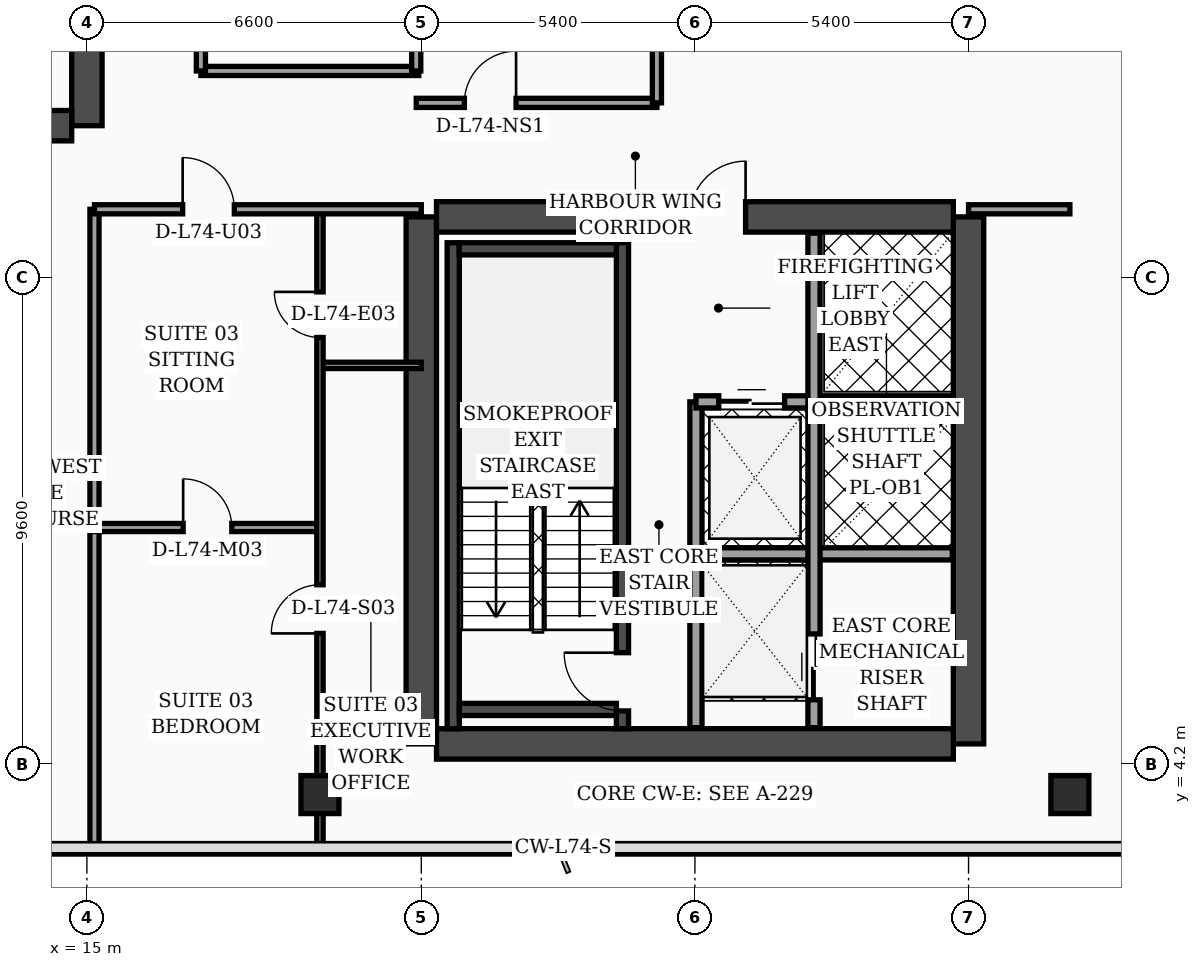
"""IFC4 building model, lengths in metres.
Left out: names, types, materials, properties, quantities, classifications, styles, units other than length and angle.
Written with IfcOpenShell. Run it as: python <this file> out.ifc"""

import sys

from ifc_helpers import new_model, si_unit, direction, frame, frame_2d, origin, origin_2d, place, context, subcontext, project, spatial, rectangle, hollow_rectangle, extrude, element, fill, save


model = new_model("IFC4")
c1 = context("Model", 3, precision=1e-05, world=origin(), true_north=direction((0.0, 1.0)))
c2 = subcontext(c1, "Body", "Model", "MODEL_VIEW")
j1 = project(units=[si_unit("LENGTHUNIT", "METRE"), si_unit("PLANEANGLEUNIT", "RADIAN")], contexts=[c1])
p1 = place(None, origin())
s1 = spatial("IfcSite", under=j1, at=p1, CompositionType="ELEMENT")
p2 = place(p1, origin())
s2 = spatial("IfcBuilding", under=s1, at=p2, CompositionType="ELEMENT")
p3 = place(p2, frame((0.0, 0.0, 298.7)))
s3 = spatial("IfcBuildingStorey", under=s2, at=p3, CompositionType="ELEMENT", Elevation=298.7)
p4 = place(p3, frame((15.0, 16.8, 0.0), z_axis=(0.0, 0.0, 1.0), x_axis=(0.0, 1.0, 0.0)))
e1 = element("IfcWall", 1, at=p4, inside=s3, PredefinedType="SHEAR", context=c2, shape_type="SweptSolid", body=[
    extrude(rectangle(XDim=21.6, YDim=0.6, at=frame_2d((10.8, 0.0))), origin(), (0.0, 0.0, 1.0), 3.56),
])
p5 = place(p4, frame((8.65, 0.0, 0.0)))
e2 = element("IfcOpeningElement", 2, at=p5, cuts=e1, PredefinedType="OPENING", context=c2, shape_type="SweptSolid", body=[
    extrude(rectangle(XDim=1.1, YDim=2.2, at=frame_2d((0.55, 1.1))), frame((0.0, 0.31, 0.0), z_axis=(0.0, -1.0, 0.0), x_axis=(1.0, 0.0, 0.0)), (0.0, 0.0, 1.0), 0.62),
])
p6 = place(p4, frame((18.9, 0.0, 0.0)))
e3 = element("IfcOpeningElement", 3, at=p6, cuts=e1, PredefinedType="OPENING", context=c2, shape_type="SweptSolid", body=[
    extrude(rectangle(XDim=1.1, YDim=2.2, at=frame_2d((0.55, 1.1))), frame((0.0, 0.31, 0.0), z_axis=(0.0, -1.0, 0.0), x_axis=(1.0, 0.0, 0.0)), (0.0, 0.0, 1.0), 0.62),
])
p7 = place(p3, frame((4.5, 16.8, 0.0), z_axis=(0.0, 0.0, 1.0), x_axis=(1.0, 0.0, 0.0)))
e4 = element("IfcWall", 4, at=p7, inside=s3, PredefinedType="SHEAR", context=c2, shape_type="SweptSolid", body=[
    extrude(rectangle(XDim=10.2, YDim=0.6, at=frame_2d((5.1, 0.0))), origin(), (0.0, 0.0, 1.0), 3.56),
])
for number, where, z_axis, x_axis in (
    (5, (21.6, 4.6, 0.0), (0.0, 0.0, 1.0), (0.0, 1.0, 0.0)),
    (6, (32.4, 4.6, 0.0), (0.0, 0.0, 1.0), (0.0, 1.0, 0.0)),
):
    element("IfcWall", number, at=place(p3, frame(where, z_axis=z_axis, x_axis=x_axis)), inside=s3, PredefinedType="SHEAR", context=c2, shape_type="SweptSolid", body=[
        extrude(rectangle(XDim=10.4, YDim=0.6, at=frame_2d((5.2, 0.0))), origin(), (0.0, 0.0, 1.0), 3.56),
    ])
p8 = place(p3, frame((21.9, 15.0, 0.0), z_axis=(0.0, 0.0, 1.0), x_axis=(1.0, 0.0, 0.0)))
e7 = element("IfcWall", 7, at=p8, inside=s3, PredefinedType="SHEAR", context=c2, shape_type="SweptSolid", body=[
    extrude(rectangle(XDim=10.2, YDim=0.6, at=frame_2d((5.1, 0.0))), origin(), (0.0, 0.0, 1.0), 3.56),
])
p9 = place(p8, frame((5.0, 0.0, 0.0)))
e8 = element("IfcOpeningElement", 8, at=p9, cuts=e7, PredefinedType="OPENING", context=c2, shape_type="SweptSolid", body=[
    extrude(rectangle(XDim=1.1, YDim=2.2, at=frame_2d((0.55, 1.1))), frame((0.0, 0.31, 0.0), z_axis=(0.0, -1.0, 0.0), x_axis=(1.0, 0.0, 0.0)), (0.0, 0.0, 1.0), 0.62),
])
p10 = place(p3, frame((21.9, 4.6, 0.0), z_axis=(0.0, 0.0, 1.0), x_axis=(1.0, 0.0, 0.0)))
e9 = element("IfcWall", 9, at=p10, inside=s3, PredefinedType="SHEAR", context=c2, shape_type="SweptSolid", body=[
    extrude(rectangle(XDim=10.2, YDim=0.6, at=frame_2d((5.1, 0.0))), origin(), (0.0, 0.0, 1.0), 3.56),
])
p11 = place(p3, frame((22.23, 4.9, 0.0), z_axis=(0.0, 0.0, 1.0), x_axis=(0.0, 1.0, 0.0)))
e10 = element("IfcWall", 10, at=p11, inside=s3, PredefinedType="SOLIDWALL", context=c2, shape_type="SweptSolid", body=[
    extrude(rectangle(XDim=9.59, YDim=0.24, at=frame_2d((4.795, 0.0))), origin(), (0.0, 0.0, 1.0), 3.56),
])
p12 = place(p3, frame((25.57, 4.9, 0.0), z_axis=(0.0, 0.0, 1.0), x_axis=(0.0, 1.0, 0.0)))
e11 = element("IfcWall", 11, at=p12, inside=s3, PredefinedType="SOLIDWALL", context=c2, shape_type="SweptSolid", body=[
    extrude(rectangle(XDim=9.59, YDim=0.24, at=frame_2d((4.795, 0.0))), origin(), (0.0, 0.0, 1.0), 3.56),
])
p13 = place(p12, frame((0.35, 0.0, 0.0)))
e12 = element("IfcOpeningElement", 12, at=p13, cuts=e11, PredefinedType="OPENING", context=c2, shape_type="SweptSolid", body=[
    extrude(rectangle(XDim=1.15, YDim=2.2, at=frame_2d((0.575, 1.1))), frame((0.0, 0.13, 0.0), z_axis=(0.0, -1.0, 0.0), x_axis=(1.0, 0.0, 0.0)), (0.0, 0.0, 1.0), 0.26),
])
for number, where, z_axis, x_axis in (
    (13, (22.35, 5.28, 0.0), (0.0, 0.0, 1.0), (1.0, 0.0, 0.0)),
    (14, (22.35, 14.37, 0.0), (0.0, 0.0, 1.0), (1.0, 0.0, 0.0)),
):
    element("IfcWall", number, at=place(p3, frame(where, z_axis=z_axis, x_axis=x_axis)), inside=s3, PredefinedType="SOLIDWALL", context=c2, shape_type="SweptSolid", body=[
        extrude(rectangle(XDim=3.1, YDim=0.24, at=frame_2d((1.55, 0.0))), origin(), (0.0, 0.0, 1.0), 3.56),
    ])
for number, where, z_axis, x_axis in (
    (15, (19.6, 3.6, 0.0), (0.0, 0.0, 1.0), (1.0, 0.0, 0.0)),
    (16, (34.4, 3.6, 0.0), (0.0, 0.0, 1.0), (1.0, 0.0, 0.0)),
):
    element("IfcColumn", number, at=place(p3, frame(where, z_axis=z_axis, x_axis=x_axis)), inside=s3, PredefinedType="COLUMN", context=c2, shape_type="SweptSolid", body=[
        extrude(hollow_rectangle(XDim=0.75, YDim=0.75, WallThickness=0.032, at=origin_2d()), origin(), (0.0, 0.0, 1.0), 3.56),
    ])
p14 = place(p3, frame((41.03, 5.505, 0.0), z_axis=(0.0, 0.0, 1.0), x_axis=(-0.300509063924, 0.953778958931, 0.0)))
e17 = element("IfcWall", 17, at=p14, inside=s3, PredefinedType="SOLIDWALL", context=c2, shape_type="SweptSolid", body=[
    extrude(rectangle(XDim=30.814, YDim=0.32, at=frame_2d((15.407, 0.0))), origin(), (0.0, 0.0, 1.0), 3.56),
])
p15 = place(p14, frame((10.199, 0.0, 0.0)))
e18 = element("IfcOpeningElement", 18, at=p15, cuts=e17, PredefinedType="OPENING", context=c2, shape_type="SweptSolid", body=[
    extrude(rectangle(XDim=1.4, YDim=2.25, at=frame_2d((0.7, 1.125))), frame((0.0, 0.17, 0.0), z_axis=(0.0, -1.0, 0.0), x_axis=(1.0, 0.0, 0.0)), (0.0, 0.0, 1.0), 0.34),
])
p16 = place(p14, frame((4.437, 0.0, 0.7)))
e19 = element("IfcOpeningElement", 19, at=p16, cuts=e17, PredefinedType="OPENING", context=c2, shape_type="SweptSolid", body=[
    extrude(rectangle(XDim=1.6, YDim=1.65, at=frame_2d((0.8, 0.825))), frame((0.0, 0.17, 0.0), z_axis=(0.0, -1.0, 0.0), x_axis=(1.0, 0.0, 0.0)), (0.0, 0.0, 1.0), 0.34),
])
p17 = place(p14, frame((18.696, 0.0, 0.7)))
e20 = element("IfcOpeningElement", 20, at=p17, cuts=e17, PredefinedType="OPENING", context=c2, shape_type="SweptSolid", body=[
    extrude(rectangle(XDim=1.6, YDim=1.65, at=frame_2d((0.8, 0.825))), frame((0.0, 0.17, 0.0), z_axis=(0.0, -1.0, 0.0), x_axis=(1.0, 0.0, 0.0)), (0.0, 0.0, 1.0), 0.34),
])
p18 = place(p14, frame((1.6, 0.0, 0.75)))
e21 = element("IfcOpeningElement", 21, at=p18, cuts=e17, PredefinedType="OPENING", context=c2, shape_type="SweptSolid", body=[
    extrude(rectangle(XDim=1.5, YDim=1.6, at=frame_2d((0.75, 0.8))), frame((0.0, 0.17, 0.0), z_axis=(0.0, -1.0, 0.0), x_axis=(1.0, 0.0, 0.0)), (0.0, 0.0, 1.0), 0.34),
])
p19 = place(p14, frame((7.8, 0.0, 0.75)))
e22 = element("IfcOpeningElement", 22, at=p19, cuts=e17, PredefinedType="OPENING", context=c2, shape_type="SweptSolid", body=[
    extrude(rectangle(XDim=1.5, YDim=1.6, at=frame_2d((0.75, 0.8))), frame((0.0, 0.17, 0.0), z_axis=(0.0, -1.0, 0.0), x_axis=(1.0, 0.0, 0.0)), (0.0, 0.0, 1.0), 0.34),
])
p20 = place(p14, frame((14.0, 0.0, 0.75)))
e23 = element("IfcOpeningElement", 23, at=p20, cuts=e17, PredefinedType="OPENING", context=c2, shape_type="SweptSolid", body=[
    extrude(rectangle(XDim=1.5, YDim=1.6, at=frame_2d((0.75, 0.8))), frame((0.0, 0.17, 0.0), z_axis=(0.0, -1.0, 0.0), x_axis=(1.0, 0.0, 0.0)), (0.0, 0.0, 1.0), 0.34),
])
p21 = place(p14, frame((16.55, 0.0, 0.75)))
e24 = element("IfcOpeningElement", 24, at=p21, cuts=e17, PredefinedType="OPENING", context=c2, shape_type="SweptSolid", body=[
    extrude(rectangle(XDim=1.5, YDim=1.6, at=frame_2d((0.75, 0.8))), frame((0.0, 0.17, 0.0), z_axis=(0.0, -1.0, 0.0), x_axis=(1.0, 0.0, 0.0)), (0.0, 0.0, 1.0), 0.34),
])
p22 = place(p14, frame((20.75, 0.0, 0.75)))
e25 = element("IfcOpeningElement", 25, at=p22, cuts=e17, PredefinedType="OPENING", context=c2, shape_type="SweptSolid", body=[
    extrude(rectangle(XDim=1.5, YDim=1.6, at=frame_2d((0.75, 0.8))), frame((0.0, 0.17, 0.0), z_axis=(0.0, -1.0, 0.0), x_axis=(1.0, 0.0, 0.0)), (0.0, 0.0, 1.0), 0.34),
])
p23 = place(p14, frame((23.3, 0.0, 0.75)))
e26 = element("IfcOpeningElement", 26, at=p23, cuts=e17, PredefinedType="OPENING", context=c2, shape_type="SweptSolid", body=[
    extrude(rectangle(XDim=1.5, YDim=1.6, at=frame_2d((0.75, 0.8))), frame((0.0, 0.17, 0.0), z_axis=(0.0, -1.0, 0.0), x_axis=(1.0, 0.0, 0.0)), (0.0, 0.0, 1.0), 0.34),
])
p24 = place(p14, frame((26.4, 0.0, 0.75)))
e27 = element("IfcOpeningElement", 27, at=p24, cuts=e17, PredefinedType="OPENING", context=c2, shape_type="SweptSolid", body=[
    extrude(rectangle(XDim=1.5, YDim=1.6, at=frame_2d((0.75, 0.8))), frame((0.0, 0.17, 0.0), z_axis=(0.0, -1.0, 0.0), x_axis=(1.0, 0.0, 0.0)), (0.0, 0.0, 1.0), 0.34),
])
p25 = place(p3, frame((27.02, 4.92, 0.0), z_axis=(0.0, 0.0, 1.0), x_axis=(0.0, 1.0, 0.0)))
e28 = element("IfcWall", 28, at=p25, inside=s3, PredefinedType="SOLIDWALL", context=c2, shape_type="SweptSolid", body=[
    extrude(rectangle(XDim=6.43, YDim=0.24, at=frame_2d((3.215, 0.0))), origin(), (0.0, 0.0, 1.0), 3.56),
])
p26 = place(p3, frame((27.02, 11.35, 0.0), z_axis=(0.0, 0.0, 1.0), x_axis=(1.0, 0.0, 0.0)))
e29 = element("IfcWall", 29, at=p26, inside=s3, PredefinedType="SOLIDWALL", context=c2, shape_type="SweptSolid", body=[
    extrude(rectangle(XDim=5.06, YDim=0.24, at=frame_2d((2.53, 0.0))), origin(), (0.0, 0.0, 1.0), 3.56),
])
p27 = place(p26, frame((0.45, 0.0, 0.0)))
e30 = element("IfcOpeningElement", 30, at=p27, cuts=e29, PredefinedType="OPENING", context=c2, shape_type="SweptSolid", body=[
    extrude(rectangle(XDim=1.3, YDim=2.35, at=frame_2d((0.65, 1.175))), frame((0.0, 0.13, 0.0), z_axis=(0.0, -1.0, 0.0), x_axis=(1.0, 0.0, 0.0)), (0.0, 0.0, 1.0), 0.26),
])
p28 = place(p3, frame((27.02, 8.35, 0.0), z_axis=(0.0, 0.0, 1.0), x_axis=(1.0, 0.0, 0.0)))
e31 = element("IfcWall", 31, at=p28, inside=s3, PredefinedType="SOLIDWALL", context=c2, shape_type="SweptSolid", body=[
    extrude(rectangle(XDim=5.06, YDim=0.24, at=frame_2d((2.53, 0.0))), origin(), (0.0, 0.0, 1.0), 3.56),
])
p29 = place(p3, frame((29.35, 4.92, 0.0), z_axis=(0.0, 0.0, 1.0), x_axis=(0.0, 1.0, 0.0)))
e32 = element("IfcWall", 32, at=p29, inside=s3, PredefinedType="SOLIDWALL", context=c2, shape_type="SweptSolid", body=[
    extrude(rectangle(XDim=9.76, YDim=0.24, at=frame_2d((4.88, 0.0))), origin(), (0.0, 0.0, 1.0), 3.56),
])
p30 = place(p29, frame((0.55, 0.0, 0.0)))
e33 = element("IfcOpeningElement", 33, at=p30, cuts=e32, PredefinedType="OPENING", context=c2, shape_type="SweptSolid", body=[
    extrude(rectangle(XDim=1.3, YDim=2.35, at=frame_2d((0.65, 1.175))), frame((0.0, 0.13, 0.0), z_axis=(0.0, -1.0, 0.0), x_axis=(1.0, 0.0, 0.0)), (0.0, 0.0, 1.0), 0.26),
])
p31 = place(p3, frame((15.15, 2.44, 0.0), z_axis=(0.0, 0.0, 1.0), x_axis=(0.0, 1.0, 0.0)))
e34 = element("IfcWall", 34, at=p31, inside=s3, PredefinedType="PARTITIONING", context=c2, shape_type="SweptSolid", body=[
    extrude(rectangle(XDim=12.71, YDim=0.18, at=frame_2d((6.355, 0.0))), origin(), (0.0, 0.0, 1.0), 3.09),
])
p32 = place(p3, frame((19.6, 12.07, 0.0), z_axis=(0.0, 0.0, 1.0), x_axis=(1.0, 0.0, 0.0)))
e35 = element("IfcWall", 35, at=p32, inside=s3, PredefinedType="PARTITIONING", context=c2, shape_type="SweptSolid", body=[
    extrude(rectangle(XDim=2.0, YDim=0.125, at=frame_2d((1.0, 0.0))), origin(), (0.0, 0.0, 1.0), 3.56),
])
p33 = place(p3, frame((15.15, 8.87, 0.0), z_axis=(0.0, 0.0, 1.0), x_axis=(1.0, 0.0, 0.0)))
e36 = element("IfcWall", 36, at=p33, inside=s3, PredefinedType="PARTITIONING", context=c2, shape_type="SweptSolid", body=[
    extrude(rectangle(XDim=4.45, YDim=0.16, at=frame_2d((2.225, 0.0))), origin(), (0.0, 0.0, 1.0), 3.56),
])
p34 = place(p33, frame((1.75, 0.0, 0.0)))
e37 = element("IfcOpeningElement", 37, at=p34, cuts=e36, PredefinedType="OPENING", context=c2, shape_type="SweptSolid", body=[
    extrude(rectangle(XDim=0.96, YDim=2.2, at=frame_2d((0.48, 1.1))), frame((0.0, 0.09, 0.0), z_axis=(0.0, -1.0, 0.0), x_axis=(1.0, 0.0, 0.0)), (0.0, 0.0, 1.0), 0.18),
])
p35 = place(p3, frame((19.6, 2.44, 0.0), z_axis=(0.0, 0.0, 1.0), x_axis=(0.0, 1.0, 0.0)))
e38 = element("IfcWall", 38, at=p35, inside=s3, PredefinedType="PARTITIONING", context=c2, shape_type="SweptSolid", body=[
    extrude(rectangle(XDim=12.71, YDim=0.125, at=frame_2d((6.355, 0.0))), origin(), (0.0, 0.0, 1.0), 2.59),
])
p36 = place(p35, frame((4.34, 0.0, 0.0)))
e39 = element("IfcOpeningElement", 39, at=p36, cuts=e38, PredefinedType="OPENING", context=c2, shape_type="SweptSolid", body=[
    extrude(rectangle(XDim=0.96, YDim=2.2, at=frame_2d((0.48, 1.1))), frame((0.0, 0.073, 0.0), z_axis=(0.0, -1.0, 0.0), x_axis=(1.0, 0.0, 0.0)), (0.0, 0.0, 1.0), 0.145),
])
p37 = place(p35, frame((10.18, 0.0, 0.0)))
e40 = element("IfcOpeningElement", 40, at=p37, cuts=e38, PredefinedType="OPENING", context=c2, shape_type="SweptSolid", body=[
    extrude(rectangle(XDim=0.9, YDim=2.15, at=frame_2d((0.45, 1.075))), frame((0.0, 0.073, 0.0), z_axis=(0.0, -1.0, 0.0), x_axis=(1.0, 0.0, 0.0)), (0.0, 0.0, 1.0), 0.145),
])
p38 = place(p3, frame((15.15, 15.15, 0.0), z_axis=(0.0, 0.0, 1.0), x_axis=(1.0, 0.0, 0.0)))
e41 = element("IfcWall", 41, at=p38, inside=s3, PredefinedType="PARTITIONING", context=c2, shape_type="SweptSolid", body=[
    extrude(rectangle(XDim=6.45, YDim=0.18, at=frame_2d((3.225, 0.0))), origin(), (0.0, 0.0, 1.0), 2.59),
])
p39 = place(p38, frame((1.74, 0.0, 0.0)))
e42 = element("IfcOpeningElement", 42, at=p39, cuts=e41, PredefinedType="OPENING", context=c2, shape_type="SweptSolid", body=[
    extrude(rectangle(XDim=1.02, YDim=2.2, at=frame_2d((0.51, 1.1))), frame((0.0, 0.1, 0.0), z_axis=(0.0, -1.0, 0.0), x_axis=(1.0, 0.0, 0.0)), (0.0, 0.0, 1.0), 0.2),
])
p40 = place(p3, frame((17.25, 17.88, 0.0), z_axis=(0.0, 0.0, 1.0), x_axis=(1.0, 0.0, 0.0)))
e43 = element("IfcWall", 43, at=p40, inside=s3, PredefinedType="PARTITIONING", context=c2, shape_type="SweptSolid", body=[
    extrude(rectangle(XDim=4.3, YDim=0.18, at=frame_2d((2.15, 0.0))), origin(), (0.0, 0.0, 1.0), 3.56),
])
p41 = place(p3, frame((21.5, 17.88, 0.0), z_axis=(0.0, 0.0, 1.0), x_axis=(0.0, 1.0, 0.0)))
e44 = element("IfcWall", 44, at=p41, inside=s3, PredefinedType="PARTITIONING", context=c2, shape_type="SweptSolid", body=[
    extrude(rectangle(XDim=6.44, YDim=0.18, at=frame_2d((3.22, 0.0))), origin(), (0.0, 0.0, 1.0), 3.09),
])
p42 = place(p3, frame((17.25, 17.88, 0.0), z_axis=(0.0, 0.0, 1.0), x_axis=(0.0, 1.0, 0.0)))
e45 = element("IfcWall", 45, at=p42, inside=s3, PredefinedType="PARTITIONING", context=c2, shape_type="SweptSolid", body=[
    extrude(rectangle(XDim=6.44, YDim=0.18, at=frame_2d((3.22, 0.0))), origin(), (0.0, 0.0, 1.0), 3.09),
])
p43 = place(p42, frame((0.65, 0.0, 0.0)))
e46 = element("IfcOpeningElement", 46, at=p43, cuts=e45, PredefinedType="OPENING", context=c2, shape_type="SweptSolid", body=[
    extrude(rectangle(XDim=0.98, YDim=2.15, at=frame_2d((0.49, 1.075))), frame((0.0, 0.1, 0.0), z_axis=(0.0, -1.0, 0.0), x_axis=(1.0, 0.0, 0.0)), (0.0, 0.0, 1.0), 0.2),
])
p44 = place(p42, frame((3.27, 0.0, 0.0)))
e47 = element("IfcOpeningElement", 47, at=p44, cuts=e45, PredefinedType="OPENING", context=c2, shape_type="SweptSolid", body=[
    extrude(rectangle(XDim=0.96, YDim=2.2, at=frame_2d((0.48, 1.1))), frame((0.0, 0.1, 0.0), z_axis=(0.0, -1.0, 0.0), x_axis=(1.0, 0.0, 0.0)), (0.0, 0.0, 1.0), 0.2),
])
p45 = place(p3, frame((32.4, 15.15, 0.0), z_axis=(0.0, 0.0, 1.0), x_axis=(1.0, 0.0, 0.0)))
e48 = element("IfcWall", 48, at=p45, inside=s3, PredefinedType="PARTITIONING", context=c2, shape_type="SweptSolid", body=[
    extrude(rectangle(XDim=2.0, YDim=0.18, at=frame_2d((1.0, 0.0))), origin(), (0.0, 0.0, 1.0), 2.99),
])
p46 = place(p3, frame((21.5, 17.25, 0.0), z_axis=(0.0, 0.0, 1.0), x_axis=(1.0, 0.0, 0.0)))
e49 = element("IfcWall", 49, at=p46, inside=s3, PredefinedType="PARTITIONING", context=c2, shape_type="SweptSolid", body=[
    extrude(rectangle(XDim=4.75, YDim=0.18, at=frame_2d((2.375, 0.0))), origin(), (0.0, 0.0, 1.0), 3.56),
])
p47 = place(p46, frame((0.95, 0.0, 0.0)))
e50 = element("IfcOpeningElement", 50, at=p47, cuts=e49, PredefinedType="OPENING", context=c2, shape_type="SweptSolid", body=[
    extrude(rectangle(XDim=1.02, YDim=2.2, at=frame_2d((0.51, 1.1))), frame((0.0, 0.1, 0.0), z_axis=(0.0, -1.0, 0.0), x_axis=(1.0, 0.0, 0.0)), (0.0, 0.0, 1.0), 0.2),
])
p48 = place(p3, frame((26.25, 17.25, 0.0), z_axis=(0.0, 0.0, 1.0), x_axis=(0.0, 1.0, 0.0)))
e51 = element("IfcWall", 51, at=p48, inside=s3, PredefinedType="PARTITIONING", context=c2, shape_type="SweptSolid", body=[
    extrude(rectangle(XDim=17.43, YDim=0.18, at=frame_2d((8.715, 0.0))), origin(), (0.0, 0.0, 1.0), 3.09),
])
p49 = place(p27, origin())
e52 = element("IfcDoor", 52, at=p49, inside=s3, OperationType="DOUBLE_DOOR_SLIDING", PredefinedType="DOOR", context=c2, shape_type="SweptSolid", body=[
    extrude(rectangle(XDim=1.3, YDim=2.35, at=frame_2d((0.65, 1.175))), frame((0.0, 0.025, 0.0), z_axis=(0.0, -1.0, 0.0), x_axis=(1.0, 0.0, 0.0)), (0.0, 0.0, 1.0), 0.05),
])
fill(e30, e52)
p50 = place(p30, origin())
e53 = element("IfcDoor", 53, at=p50, inside=s3, OperationType="DOUBLE_DOOR_SLIDING", PredefinedType="DOOR", context=c2, shape_type="SweptSolid", body=[
    extrude(rectangle(XDim=1.3, YDim=2.35, at=frame_2d((0.65, 1.175))), frame((0.0, 0.025, 0.0), z_axis=(0.0, -1.0, 0.0), x_axis=(1.0, 0.0, 0.0)), (0.0, 0.0, 1.0), 0.05),
])
fill(e33, e53)
p51 = place(p34, origin())
e54 = element("IfcDoor", 54, at=p51, inside=s3, OperationType="SINGLE_SWING_LEFT", PredefinedType="DOOR", context=c2, shape_type="SweptSolid", body=[
    extrude(rectangle(XDim=0.96, YDim=2.2, at=frame_2d((0.48, 1.1))), frame((0.0, 0.025, 0.0), z_axis=(0.0, -1.0, 0.0), x_axis=(1.0, 0.0, 0.0)), (0.0, 0.0, 1.0), 0.05),
])
fill(e37, e54)
p52 = place(p36, origin())
e55 = element("IfcDoor", 55, at=p52, inside=s3, OperationType="SINGLE_SWING_LEFT", PredefinedType="DOOR", context=c2, shape_type="SweptSolid", body=[
    extrude(rectangle(XDim=0.96, YDim=2.2, at=frame_2d((0.48, 1.1))), frame((0.0, 0.025, 0.0), z_axis=(0.0, -1.0, 0.0), x_axis=(1.0, 0.0, 0.0)), (0.0, 0.0, 1.0), 0.05),
])
fill(e39, e55)
p53 = place(p37, origin())
e56 = element("IfcDoor", 56, at=p53, inside=s3, OperationType="SINGLE_SWING_RIGHT", PredefinedType="DOOR", context=c2, shape_type="SweptSolid", body=[
    extrude(rectangle(XDim=0.9, YDim=2.15, at=frame_2d((0.45, 1.075))), frame((0.0, 0.025, 0.0), z_axis=(0.0, -1.0, 0.0), x_axis=(1.0, 0.0, 0.0)), (0.0, 0.0, 1.0), 0.05),
])
fill(e40, e56)
p54 = place(p39, origin())
e57 = element("IfcDoor", 57, at=p54, inside=s3, OperationType="SINGLE_SWING_LEFT", PredefinedType="DOOR", context=c2, shape_type="SweptSolid", body=[
    extrude(rectangle(XDim=1.02, YDim=2.2, at=frame_2d((0.51, 1.1))), frame((0.0, 0.025, 0.0), z_axis=(0.0, -1.0, 0.0), x_axis=(1.0, 0.0, 0.0)), (0.0, 0.0, 1.0), 0.05),
])
fill(e42, e57)
p55 = place(p47, origin())
e58 = element("IfcDoor", 58, at=p55, inside=s3, OperationType="SINGLE_SWING_RIGHT", PredefinedType="DOOR", context=c2, shape_type="SweptSolid", body=[
    extrude(rectangle(XDim=1.02, YDim=2.2, at=frame_2d((0.51, 1.1))), frame((0.0, 0.025, 0.0), z_axis=(0.0, -1.0, 0.0), x_axis=(1.0, 0.0, 0.0)), (0.0, 0.0, 1.0), 0.05),
])
fill(e50, e58)
p56 = place(p13, origin())
e59 = element("IfcDoor", 59, at=p56, inside=s3, OperationType="SINGLE_SWING_RIGHT", PredefinedType="DOOR", context=c2, shape_type="SweptSolid", body=[
    extrude(rectangle(XDim=1.15, YDim=2.2, at=frame_2d((0.575, 1.1))), frame((0.0, 0.025, 0.0), z_axis=(0.0, -1.0, 0.0), x_axis=(1.0, 0.0, 0.0)), (0.0, 0.0, 1.0), 0.05),
])
fill(e12, e59)
p57 = place(p9, origin())
e60 = element("IfcDoor", 60, at=p57, inside=s3, OperationType="SINGLE_SWING_RIGHT", PredefinedType="DOOR", context=c2, shape_type="SweptSolid", body=[
    extrude(rectangle(XDim=1.1, YDim=2.2, at=frame_2d((0.55, 1.1))), frame((0.0, 0.025, 0.0), z_axis=(0.0, -1.0, 0.0), x_axis=(1.0, 0.0, 0.0)), (0.0, 0.0, 1.0), 0.05),
])
fill(e8, e60)
save(model, sys.argv[1])
